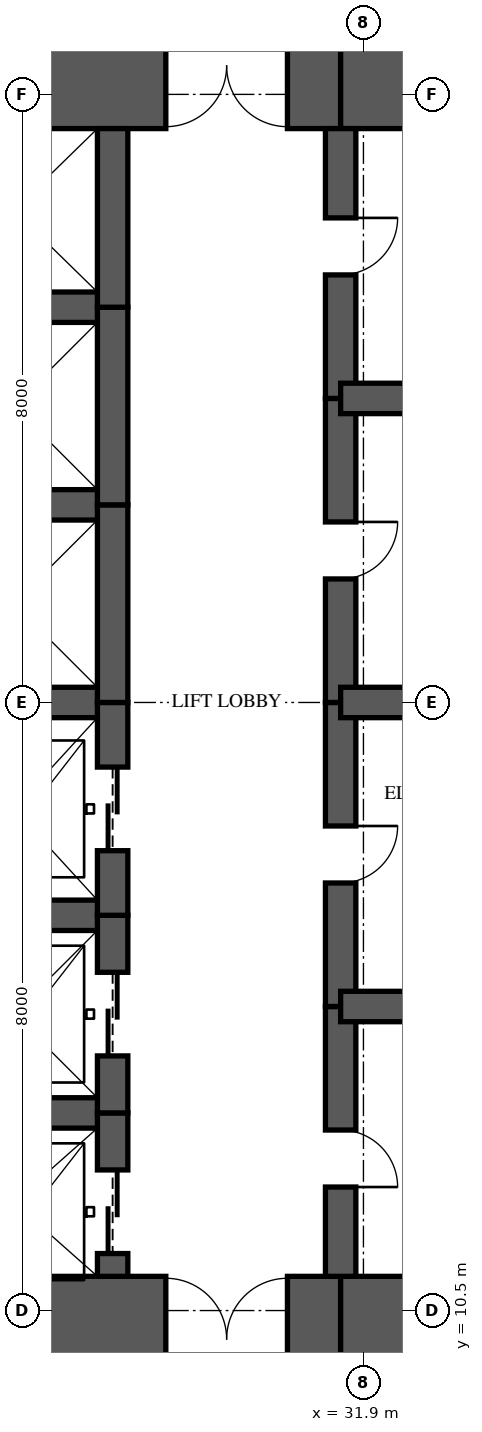
"""IFC4 building model, lengths in metres.
Left out: names, types, materials, properties, quantities, classifications, styles, units other than length and angle.
Written with IfcOpenShell. Run it as: python <this file> out.ifc"""

import sys

from ifc_helpers import new_model, si_unit, direction, frame, frame_2d, origin, place, context, subcontext, project, spatial, rectangle, extrude, element, fill, save


model = new_model("IFC4")
c1 = context("Model", 3, precision=1e-05, world=origin(), true_north=direction((0.0, 1.0)))
c2 = subcontext(c1, "Body", "Model", "MODEL_VIEW")
j1 = project(units=[si_unit("LENGTHUNIT", "METRE"), si_unit("PLANEANGLEUNIT", "RADIAN")], contexts=[c1])
p1 = place(None, origin())
s1 = spatial("IfcSite", under=j1, at=p1, CompositionType="ELEMENT")
p2 = place(p1, origin())
s2 = spatial("IfcBuilding", under=s1, at=p2, CompositionType="ELEMENT")
p3 = place(p2, frame((0.0, 0.0, 64.55)))
s3 = spatial("IfcBuildingStorey", under=s2, at=p3, CompositionType="ELEMENT", Elevation=64.55)
p4 = place(p3, frame((26.0, 10.125, 0.0), z_axis=(0.0, 0.0, 1.0), x_axis=(1.0, 0.0, 0.0)))
e1 = element("IfcWall", 1, at=p4, inside=s3, PredefinedType="SHEAR", context=c2, shape_type="SweptSolid", body=[
    extrude(rectangle(XDim=5.6, YDim=1.65, at=frame_2d((2.8, 0.0))), origin(), (0.0, 0.0, 1.0), 3.35),
])
p5 = place(p4, frame((3.3, 0.0, 0.0)))
e2 = element("IfcOpeningElement", 2, at=p5, cuts=e1, PredefinedType="OPENING", context=c2, shape_type="SweptSolid", body=[
    extrude(rectangle(XDim=1.6, YDim=2.1, at=frame_2d((0.8, 1.05))), frame((0.0, 0.835, 0.0), z_axis=(0.0, -1.0, 0.0), x_axis=(1.0, 0.0, 0.0)), (0.0, 0.0, 1.0), 1.67),
])
for number, where, z_axis, x_axis in (
    (3, (31.6, 10.125, 0.0), (0.0, 0.0, 1.0), (1.0, 0.0, 0.0)),
    (4, (35.9, 26.875, 0.0), (0.0, 0.0, 1.0), (-1.0, 0.0, 0.0)),
):
    element("IfcWall", number, at=place(p3, frame(where, z_axis=z_axis, x_axis=x_axis)), inside=s3, PredefinedType="SHEAR", context=c2, shape_type="SweptSolid", body=[
        extrude(rectangle(XDim=4.3, YDim=1.65, at=frame_2d((2.15, 0.0))), origin(), (0.0, 0.0, 1.0), 3.35),
    ])
p6 = place(p3, frame((31.6, 26.875, 0.0), z_axis=(0.0, 0.0, 1.0), x_axis=(-1.0, 0.0, 0.0)))
e5 = element("IfcWall", 5, at=p6, inside=s3, PredefinedType="SHEAR", context=c2, shape_type="SweptSolid", body=[
    extrude(rectangle(XDim=5.6, YDim=1.65, at=frame_2d((2.8, 0.0))), origin(), (0.0, 0.0, 1.0), 3.35),
])
p7 = place(p6, frame((0.7, 0.0, 0.0)))
e6 = element("IfcOpeningElement", 6, at=p7, cuts=e5, PredefinedType="OPENING", context=c2, shape_type="SweptSolid", body=[
    extrude(rectangle(XDim=1.6, YDim=2.1, at=frame_2d((0.8, 1.05))), frame((0.0, 0.835, 0.0), z_axis=(0.0, -1.0, 0.0), x_axis=(1.0, 0.0, 0.0)), (0.0, 0.0, 1.0), 1.67),
])
p8 = place(p3, frame((28.6, 10.95, 0.0), z_axis=(0.0, 0.0, 1.0), x_axis=(0.0, 1.0, 0.0)))
e7 = element("IfcWall", 7, at=p8, inside=s3, PredefinedType="SHEAR", context=c2, shape_type="SweptSolid", body=[
    extrude(rectangle(XDim=2.15, YDim=0.4, at=frame_2d((1.075, 0.0))), origin(), (0.0, 0.0, 1.0), 3.35),
])
p9 = place(p8, frame((0.3, 0.0, 0.0)))
e8 = element("IfcOpeningElement", 8, at=p9, cuts=e7, PredefinedType="OPENING", context=c2, shape_type="SweptSolid", body=[
    extrude(rectangle(XDim=1.1, YDim=2.1, at=frame_2d((0.55, 1.05))), frame((0.0, 0.21, 0.0), z_axis=(0.0, -1.0, 0.0), x_axis=(1.0, 0.0, 0.0)), (0.0, 0.0, 1.0), 0.42),
])
p10 = place(p3, frame((28.6, 13.1, 0.0), z_axis=(0.0, 0.0, 1.0), x_axis=(0.0, 1.0, 0.0)))
e9 = element("IfcWall", 9, at=p10, inside=s3, PredefinedType="SHEAR", context=c2, shape_type="SweptSolid", body=[
    extrude(rectangle(XDim=2.6, YDim=0.4, at=frame_2d((1.3, 0.0))), origin(), (0.0, 0.0, 1.0), 3.35),
])
p11 = place(p10, frame((0.75, 0.0, 0.0)))
e10 = element("IfcOpeningElement", 10, at=p11, cuts=e9, PredefinedType="OPENING", context=c2, shape_type="SweptSolid", body=[
    extrude(rectangle(XDim=1.1, YDim=2.1, at=frame_2d((0.55, 1.05))), frame((0.0, 0.21, 0.0), z_axis=(0.0, -1.0, 0.0), x_axis=(1.0, 0.0, 0.0)), (0.0, 0.0, 1.0), 0.42),
])
p12 = place(p3, frame((28.6, 15.7, 0.0), z_axis=(0.0, 0.0, 1.0), x_axis=(0.0, 1.0, 0.0)))
e11 = element("IfcWall", 11, at=p12, inside=s3, PredefinedType="SHEAR", context=c2, shape_type="SweptSolid", body=[
    extrude(rectangle(XDim=2.8, YDim=0.4, at=frame_2d((1.4, 0.0))), origin(), (0.0, 0.0, 1.0), 3.35),
])
p13 = place(p12, frame((0.85, 0.0, 0.0)))
e12 = element("IfcOpeningElement", 12, at=p13, cuts=e11, PredefinedType="OPENING", context=c2, shape_type="SweptSolid", body=[
    extrude(rectangle(XDim=1.1, YDim=2.1, at=frame_2d((0.55, 1.05))), frame((0.0, 0.21, 0.0), z_axis=(0.0, -1.0, 0.0), x_axis=(1.0, 0.0, 0.0)), (0.0, 0.0, 1.0), 0.42),
])
p14 = place(p3, frame((28.6, 18.5, 0.0), z_axis=(0.0, 0.0, 1.0), x_axis=(0.0, 1.0, 0.0)))
e13 = element("IfcWall", 13, at=p14, inside=s3, PredefinedType="SHEAR", context=c2, shape_type="SweptSolid", body=[
    extrude(rectangle(XDim=2.6, YDim=0.4, at=frame_2d((1.3, 0.0))), origin(), (0.0, 0.0, 1.0), 3.35),
])
p15 = place(p3, frame((28.6, 21.1, 0.0), z_axis=(0.0, 0.0, 1.0), x_axis=(0.0, 1.0, 0.0)))
e14 = element("IfcWall", 14, at=p15, inside=s3, PredefinedType="SHEAR", context=c2, shape_type="SweptSolid", body=[
    extrude(rectangle(XDim=2.6, YDim=0.4, at=frame_2d((1.3, 0.0))), origin(), (0.0, 0.0, 1.0), 3.35),
])
p16 = place(p3, frame((28.6, 23.7, 0.0), z_axis=(0.0, 0.0, 1.0), x_axis=(0.0, 1.0, 0.0)))
e15 = element("IfcWall", 15, at=p16, inside=s3, PredefinedType="SHEAR", context=c2, shape_type="SweptSolid", body=[
    extrude(rectangle(XDim=2.35, YDim=0.4, at=frame_2d((1.175, 0.0))), origin(), (0.0, 0.0, 1.0), 3.35),
])
p17 = place(p3, frame((31.6, 10.95, 0.0), z_axis=(0.0, 0.0, 1.0), x_axis=(0.0, 1.0, 0.0)))
e16 = element("IfcWall", 16, at=p17, inside=s3, PredefinedType="SHEAR", context=c2, shape_type="SweptSolid", body=[
    extrude(rectangle(XDim=3.55, YDim=0.4, at=frame_2d((1.775, 0.0))), origin(), (0.0, 0.0, 1.0), 3.35),
])
p18 = place(p17, frame((1.175, 0.0, 0.0)))
e17 = element("IfcOpeningElement", 17, at=p18, cuts=e16, PredefinedType="OPENING", context=c2, shape_type="SweptSolid", body=[
    extrude(rectangle(XDim=0.75, YDim=2.1, at=frame_2d((0.375, 1.05))), frame((0.0, 0.21, 0.0), z_axis=(0.0, -1.0, 0.0), x_axis=(1.0, 0.0, 0.0)), (0.0, 0.0, 1.0), 0.42),
])
p19 = place(p3, frame((31.6, 14.5, 0.0), z_axis=(0.0, 0.0, 1.0), x_axis=(0.0, 1.0, 0.0)))
e18 = element("IfcWall", 18, at=p19, inside=s3, PredefinedType="SHEAR", context=c2, shape_type="SweptSolid", body=[
    extrude(rectangle(XDim=4.0, YDim=0.4, at=frame_2d((2.0, 0.0))), origin(), (0.0, 0.0, 1.0), 3.35),
])
p20 = place(p19, frame((1.625, 0.0, 0.0)))
e19 = element("IfcOpeningElement", 19, at=p20, cuts=e18, PredefinedType="OPENING", context=c2, shape_type="SweptSolid", body=[
    extrude(rectangle(XDim=0.75, YDim=2.1, at=frame_2d((0.375, 1.05))), frame((0.0, 0.21, 0.0), z_axis=(0.0, -1.0, 0.0), x_axis=(1.0, 0.0, 0.0)), (0.0, 0.0, 1.0), 0.42),
])
p21 = place(p3, frame((31.6, 18.5, 0.0), z_axis=(0.0, 0.0, 1.0), x_axis=(0.0, 1.0, 0.0)))
e20 = element("IfcWall", 20, at=p21, inside=s3, PredefinedType="SHEAR", context=c2, shape_type="SweptSolid", body=[
    extrude(rectangle(XDim=4.0, YDim=0.4, at=frame_2d((2.0, 0.0))), origin(), (0.0, 0.0, 1.0), 3.35),
])
p22 = place(p21, frame((1.625, 0.0, 0.0)))
e21 = element("IfcOpeningElement", 21, at=p22, cuts=e20, PredefinedType="OPENING", context=c2, shape_type="SweptSolid", body=[
    extrude(rectangle(XDim=0.75, YDim=2.1, at=frame_2d((0.375, 1.05))), frame((0.0, 0.21, 0.0), z_axis=(0.0, -1.0, 0.0), x_axis=(1.0, 0.0, 0.0)), (0.0, 0.0, 1.0), 0.42),
])
p23 = place(p3, frame((31.6, 22.5, 0.0), z_axis=(0.0, 0.0, 1.0), x_axis=(0.0, 1.0, 0.0)))
e22 = element("IfcWall", 22, at=p23, inside=s3, PredefinedType="SHEAR", context=c2, shape_type="SweptSolid", body=[
    extrude(rectangle(XDim=3.55, YDim=0.4, at=frame_2d((1.775, 0.0))), origin(), (0.0, 0.0, 1.0), 3.35),
])
p24 = place(p23, frame((1.625, 0.0, 0.0)))
e23 = element("IfcOpeningElement", 23, at=p24, cuts=e22, PredefinedType="OPENING", context=c2, shape_type="SweptSolid", body=[
    extrude(rectangle(XDim=0.75, YDim=2.1, at=frame_2d((0.375, 1.05))), frame((0.0, 0.21, 0.0), z_axis=(0.0, -1.0, 0.0), x_axis=(1.0, 0.0, 0.0)), (0.0, 0.0, 1.0), 0.42),
])
for number, where, z_axis, x_axis in (
    (24, (26.0, 13.1, 0.0), (0.0, 0.0, 1.0), (1.0, 0.0, 0.0)),
    (25, (26.0, 15.7, 0.0), (0.0, 0.0, 1.0), (1.0, 0.0, 0.0)),
    (26, (26.0, 18.5, 0.0), (0.0, 0.0, 1.0), (1.0, 0.0, 0.0)),
    (27, (26.0, 21.1, 0.0), (0.0, 0.0, 1.0), (1.0, 0.0, 0.0)),
    (28, (26.0, 23.7, 0.0), (0.0, 0.0, 1.0), (1.0, 0.0, 0.0)),
):
    element("IfcWall", number, at=place(p3, frame(where, z_axis=z_axis, x_axis=x_axis)), inside=s3, PredefinedType="SHEAR", context=c2, shape_type="SweptSolid", body=[
        extrude(rectangle(XDim=2.6, YDim=0.4, at=frame_2d((1.3, 0.0))), origin(), (0.0, 0.0, 1.0), 3.35),
    ])
for number, where, z_axis, x_axis in (
    (29, (31.6, 14.5, 0.0), (0.0, 0.0, 1.0), (1.0, 0.0, 0.0)),
    (30, (31.6, 18.5, 0.0), (0.0, 0.0, 1.0), (1.0, 0.0, 0.0)),
    (31, (31.6, 22.5, 0.0), (0.0, 0.0, 1.0), (1.0, 0.0, 0.0)),
):
    element("IfcWall", number, at=place(p3, frame(where, z_axis=z_axis, x_axis=x_axis)), inside=s3, PredefinedType="SHEAR", context=c2, shape_type="SweptSolid", body=[
        extrude(rectangle(XDim=4.3, YDim=0.4, at=frame_2d((2.15, 0.0))), origin(), (0.0, 0.0, 1.0), 3.35),
    ])
p25 = place(p9, origin())
e32 = element("IfcDoor", 32, at=p25, inside=s3, OperationType="SLIDING_TO_LEFT", PredefinedType="DOOR", context=c2, shape_type="SweptSolid", body=[
    extrude(rectangle(XDim=1.1, YDim=2.1, at=frame_2d((0.55, 1.05))), frame((0.0, 0.025, 0.0), z_axis=(0.0, -1.0, 0.0), x_axis=(1.0, 0.0, 0.0)), (0.0, 0.0, 1.0), 0.05),
])
fill(e8, e32)
p26 = place(p11, origin())
e33 = element("IfcDoor", 33, at=p26, inside=s3, OperationType="SLIDING_TO_LEFT", PredefinedType="DOOR", context=c2, shape_type="SweptSolid", body=[
    extrude(rectangle(XDim=1.1, YDim=2.1, at=frame_2d((0.55, 1.05))), frame((0.0, 0.025, 0.0), z_axis=(0.0, -1.0, 0.0), x_axis=(1.0, 0.0, 0.0)), (0.0, 0.0, 1.0), 0.05),
])
fill(e10, e33)
p27 = place(p13, origin())
e34 = element("IfcDoor", 34, at=p27, inside=s3, OperationType="SLIDING_TO_LEFT", PredefinedType="DOOR", context=c2, shape_type="SweptSolid", body=[
    extrude(rectangle(XDim=1.1, YDim=2.1, at=frame_2d((0.55, 1.05))), frame((0.0, 0.025, 0.0), z_axis=(0.0, -1.0, 0.0), x_axis=(1.0, 0.0, 0.0)), (0.0, 0.0, 1.0), 0.05),
])
fill(e12, e34)
p28 = place(p5, origin())
e35 = element("IfcDoor", 35, at=p28, inside=s3, OperationType="DOUBLE_DOOR_SINGLE_SWING", PredefinedType="DOOR", context=c2, shape_type="SweptSolid", body=[
    extrude(rectangle(XDim=1.6, YDim=2.1, at=frame_2d((0.8, 1.05))), frame((0.0, 0.025, 0.0), z_axis=(0.0, -1.0, 0.0), x_axis=(1.0, 0.0, 0.0)), (0.0, 0.0, 1.0), 0.05),
])
fill(e2, e35)
p29 = place(p7, origin())
e36 = element("IfcDoor", 36, at=p29, inside=s3, OperationType="DOUBLE_DOOR_SINGLE_SWING", PredefinedType="DOOR", context=c2, shape_type="SweptSolid", body=[
    extrude(rectangle(XDim=1.6, YDim=2.1, at=frame_2d((0.8, 1.05))), frame((0.0, 0.025, 0.0), z_axis=(0.0, -1.0, 0.0), x_axis=(1.0, 0.0, 0.0)), (0.0, 0.0, 1.0), 0.05),
])
fill(e6, e36)
p30 = place(p18, frame((0.75, 0.0, 0.0), z_axis=(0.0, 0.0, 1.0), x_axis=(-1.0, 0.0, 0.0)))
e37 = element("IfcDoor", 37, at=p30, inside=s3, OperationType="SINGLE_SWING_RIGHT", PredefinedType="DOOR", context=c2, shape_type="SweptSolid", body=[
    extrude(rectangle(XDim=0.75, YDim=2.1, at=frame_2d((0.375, 1.05))), frame((0.0, 0.025, 0.0), z_axis=(0.0, -1.0, 0.0), x_axis=(1.0, 0.0, 0.0)), (0.0, 0.0, 1.0), 0.05),
])
fill(e17, e37)
p31 = place(p20, frame((0.75, 0.0, 0.0), z_axis=(0.0, 0.0, 1.0), x_axis=(-1.0, 0.0, 0.0)))
e38 = element("IfcDoor", 38, at=p31, inside=s3, OperationType="SINGLE_SWING_LEFT", PredefinedType="DOOR", context=c2, shape_type="SweptSolid", body=[
    extrude(rectangle(XDim=0.75, YDim=2.1, at=frame_2d((0.375, 1.05))), frame((0.0, 0.025, 0.0), z_axis=(0.0, -1.0, 0.0), x_axis=(1.0, 0.0, 0.0)), (0.0, 0.0, 1.0), 0.05),
])
fill(e19, e38)
p32 = place(p22, frame((0.75, 0.0, 0.0), z_axis=(0.0, 0.0, 1.0), x_axis=(-1.0, 0.0, 0.0)))
e39 = element("IfcDoor", 39, at=p32, inside=s3, OperationType="SINGLE_SWING_LEFT", PredefinedType="DOOR", context=c2, shape_type="SweptSolid", body=[
    extrude(rectangle(XDim=0.75, YDim=2.1, at=frame_2d((0.375, 1.05))), frame((0.0, 0.025, 0.0), z_axis=(0.0, -1.0, 0.0), x_axis=(1.0, 0.0, 0.0)), (0.0, 0.0, 1.0), 0.05),
])
fill(e21, e39)
p33 = place(p24, frame((0.75, 0.0, 0.0), z_axis=(0.0, 0.0, 1.0), x_axis=(-1.0, 0.0, 0.0)))
e40 = element("IfcDoor", 40, at=p33, inside=s3, OperationType="SINGLE_SWING_LEFT", PredefinedType="DOOR", context=c2, shape_type="SweptSolid", body=[
    extrude(rectangle(XDim=0.75, YDim=2.1, at=frame_2d((0.375, 1.05))), frame((0.0, 0.025, 0.0), z_axis=(0.0, -1.0, 0.0), x_axis=(1.0, 0.0, 0.0)), (0.0, 0.0, 1.0), 0.05),
])
fill(e23, e40)
save(model, sys.argv[1])
